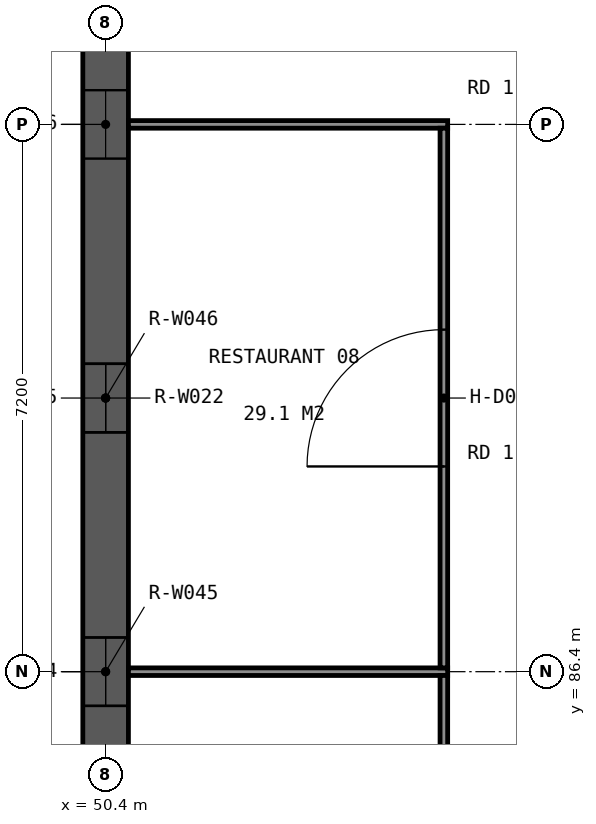
"""IFC4 building model, lengths in metres.
Left out: names, types, materials, properties, quantities, classifications, styles, units other than length and angle.
Written with IfcOpenShell. Run it as: python <this file> out.ifc"""

import sys

from ifc_helpers import new_model, si_unit, direction, frame, frame_2d, origin, place, context, subcontext, project, spatial, polyline, rectangle, outline, extrude, element, fill, save


model = new_model("IFC4")
c1 = context("Model", 3, precision=1e-05, world=origin(), true_north=direction((0.0, 1.0)))
c2 = subcontext(c1, "Body", "Model", "MODEL_VIEW")
j1 = project(units=[si_unit("LENGTHUNIT", "METRE"), si_unit("PLANEANGLEUNIT", "RADIAN")], contexts=[c1])
p1 = place(None, origin())
s1 = spatial("IfcSite", under=j1, at=p1, CompositionType="ELEMENT")
p2 = place(p1, origin())
s2 = spatial("IfcBuilding", under=s1, at=p2, CompositionType="ELEMENT")
p3 = place(p2, frame((0.0, 0.0, 9.6)))
s3 = spatial("IfcBuildingStorey", under=s2, at=p3, CompositionType="ELEMENT", Elevation=9.6)
p4 = place(p3, frame((50.4, 52.2, 0.0), z_axis=(0.0, 0.0, 1.0), x_axis=(0.0, 1.0, 0.0)))
e1 = element("IfcWall", 1, at=p4, inside=s3, PredefinedType="SOLIDWALL", context=c2, shape_type="SweptSolid", body=[
    extrude(outline(polyline([(0.0, 0.0), (54.0, 0.0), (54.0, 6.409), (53.7, 6.509), (53.4, 6.609), (53.1, 6.709), (52.8, 6.809), (52.5, 6.909), (52.2, 7.009), (51.9, 7.109), (51.6, 7.209), (51.3, 7.309), (51.0, 7.409), (50.764, 7.488), (50.762, 7.489), (50.7, 7.509), (50.4, 7.609), (50.1, 7.709), (49.8, 7.809), (49.5, 7.909), (49.2, 8.009), (48.9, 8.109), (48.6, 8.209), (48.3, 8.309), (48.0, 8.409), (47.7, 8.509), (47.4, 8.609), (47.1, 8.709), (46.8, 8.809), (46.5, 8.909), (46.2, 9.009), (46.027, 9.067), (46.025, 9.068), (45.964, 9.088), (45.962, 9.3), (45.9, 9.32), (45.6, 9.42), (45.3, 9.52), (45.0, 9.62), (44.7, 9.72), (44.4, 9.82), (44.1, 9.92), (43.8, 10.02), (43.5, 10.12), (43.2, 10.22), (42.9, 10.32), (42.6, 10.42), (42.3, 10.52), (42.0, 10.62), (41.7, 10.72), (41.4, 10.82), (41.227, 10.878), (41.225, 10.878), (41.1, 10.92), (40.8, 11.02), (40.5, 11.12), (40.2, 11.22), (39.9, 11.32), (39.6, 11.42), (39.3, 11.52), (39.0, 11.62), (38.7, 11.72), (38.4, 11.82), (38.1, 11.92), (37.8, 12.02), (37.5, 12.12), (37.2, 12.22), (36.9, 12.32), (36.6, 12.42), (36.49, 12.457), (36.488, 12.458), (36.427, 12.478), (36.425, 12.689), (36.3, 12.731), (36.0, 12.831), (35.7, 12.931), (35.4, 13.031), (35.1, 13.131), (34.8, 13.231), (34.5, 13.331), (34.2, 13.431), (33.9, 13.531), (33.6, 13.631), (33.3, 13.731), (33.0, 13.831), (32.7, 13.931), (32.4, 14.031), (32.1, 14.131), (31.8, 14.231), (31.69, 14.268), (31.688, 14.268), (31.5, 14.331), (31.2, 14.431), (30.9, 14.531), (30.6, 14.631), (30.3, 14.731), (30.0, 14.831), (29.7, 14.931), (29.4, 15.031), (29.1, 15.131), (28.8, 15.231), (28.5, 15.331), (28.2, 15.431), (27.9, 15.531), (27.6, 15.631), (27.3, 15.731), (27.201, 15.764), (27.199, 15.764), (27.0, 15.764), (26.801, 15.764), (26.799, 15.764), (26.7, 15.731), (26.4, 15.631), (26.1, 15.531), (25.8, 15.431), (25.5, 15.331), (25.2, 15.231), (24.9, 15.131), (24.6, 15.031), (24.3, 14.931), (24.0, 14.831), (23.7, 14.731), (23.4, 14.631), (23.1, 14.531), (22.8, 14.431), (22.5, 14.331), (22.312, 14.268), (22.31, 14.268), (22.2, 14.231), (21.9, 14.131), (21.6, 14.031), (21.3, 13.931), (21.0, 13.831), (20.7, 13.731), (20.4, 13.631), (20.1, 13.531), (19.8, 13.431), (19.5, 13.331), (19.2, 13.231), (18.9, 13.131), (18.6, 13.031), (18.3, 12.931), (18.0, 12.831), (17.7, 12.731), (17.575, 12.689), (17.573, 12.478), (17.512, 12.458), (17.51, 12.457), (17.4, 12.42), (17.1, 12.32), (16.8, 12.22), (16.5, 12.12), (16.2, 12.02), (15.9, 11.92), (15.6, 11.82), (15.3, 11.72), (15.0, 11.62), (14.7, 11.52), (14.4, 11.42), (14.1, 11.32), (13.8, 11.22), (13.5, 11.12), (13.2, 11.02), (12.9, 10.92), (12.775, 10.878), (12.773, 10.878), (12.6, 10.82), (12.3, 10.72), (12.0, 10.62), (11.7, 10.52), (11.4, 10.42), (11.1, 10.32), (10.8, 10.22), (10.5, 10.12), (10.2, 10.02), (9.9, 9.92), (9.6, 9.82), (9.3, 9.72), (9.0, 9.62), (8.7, 9.52), (8.4, 9.42), (8.1, 9.32), (8.038, 9.3), (8.036, 9.088), (7.975, 9.068), (7.973, 9.067), (7.8, 9.009), (7.5, 8.909), (7.2, 8.809), (6.9, 8.709), (6.6, 8.609), (6.3, 8.509), (6.0, 8.409), (5.7, 8.309), (5.4, 8.209), (5.1, 8.109), (4.8, 8.009), (4.5, 7.909), (4.2, 7.809), (3.9, 7.709), (3.6, 7.609), (3.3, 7.509), (3.238, 7.489), (3.236, 7.488), (3.0, 7.409), (2.7, 7.309), (2.4, 7.209), (2.1, 7.109), (1.8, 7.009), (1.5, 6.909), (1.2, 6.809), (0.9, 6.709), (0.6, 6.609), (0.3, 6.509), (0.0, 6.409), (0.0, 0.0)])), frame((0.0, 0.3, 0.0), z_axis=(0.0, -1.0, 0.0), x_axis=(1.0, 0.0, 0.0)), (0.0, 0.0, 1.0), 0.6),
])
p5 = place(p4, frame((1.35, 0.0, 0.9)))
e2 = element("IfcOpeningElement", 2, at=p5, cuts=e1, PredefinedType="OPENING", context=c2, shape_type="SweptSolid", body=[
    extrude(rectangle(XDim=0.9, YDim=3.3, at=frame_2d((0.45, 1.65))), frame((0.0, 0.31, 0.0), z_axis=(0.0, -1.0, 0.0), x_axis=(1.0, 0.0, 0.0)), (0.0, 0.0, 1.0), 0.62),
])
p6 = place(p4, frame((8.55, 0.0, 0.9)))
e3 = element("IfcOpeningElement", 3, at=p6, cuts=e1, PredefinedType="OPENING", context=c2, shape_type="SweptSolid", body=[
    extrude(rectangle(XDim=0.9, YDim=3.3, at=frame_2d((0.45, 1.65))), frame((0.0, 0.31, 0.0), z_axis=(0.0, -1.0, 0.0), x_axis=(1.0, 0.0, 0.0)), (0.0, 0.0, 1.0), 0.62),
])
p7 = place(p4, frame((15.75, 0.0, 0.9)))
e4 = element("IfcOpeningElement", 4, at=p7, cuts=e1, PredefinedType="OPENING", context=c2, shape_type="SweptSolid", body=[
    extrude(rectangle(XDim=0.9, YDim=3.3, at=frame_2d((0.45, 1.65))), frame((0.0, 0.31, 0.0), z_axis=(0.0, -1.0, 0.0), x_axis=(1.0, 0.0, 0.0)), (0.0, 0.0, 1.0), 0.62),
])
p8 = place(p4, frame((22.95, 0.0, 0.9)))
e5 = element("IfcOpeningElement", 5, at=p8, cuts=e1, PredefinedType="OPENING", context=c2, shape_type="SweptSolid", body=[
    extrude(rectangle(XDim=0.9, YDim=3.3, at=frame_2d((0.45, 1.65))), frame((0.0, 0.31, 0.0), z_axis=(0.0, -1.0, 0.0), x_axis=(1.0, 0.0, 0.0)), (0.0, 0.0, 1.0), 0.62),
])
p9 = place(p4, frame((30.15, 0.0, 0.9)))
e6 = element("IfcOpeningElement", 6, at=p9, cuts=e1, PredefinedType="OPENING", context=c2, shape_type="SweptSolid", body=[
    extrude(rectangle(XDim=0.9, YDim=3.3, at=frame_2d((0.45, 1.65))), frame((0.0, 0.31, 0.0), z_axis=(0.0, -1.0, 0.0), x_axis=(1.0, 0.0, 0.0)), (0.0, 0.0, 1.0), 0.62),
])
p10 = place(p4, frame((37.35, 0.0, 0.9)))
e7 = element("IfcOpeningElement", 7, at=p10, cuts=e1, PredefinedType="OPENING", context=c2, shape_type="SweptSolid", body=[
    extrude(rectangle(XDim=0.9, YDim=3.3, at=frame_2d((0.45, 1.65))), frame((0.0, 0.31, 0.0), z_axis=(0.0, -1.0, 0.0), x_axis=(1.0, 0.0, 0.0)), (0.0, 0.0, 1.0), 0.62),
])
p11 = place(p4, frame((44.55, 0.0, 0.9)))
e8 = element("IfcOpeningElement", 8, at=p11, cuts=e1, PredefinedType="OPENING", context=c2, shape_type="SweptSolid", body=[
    extrude(rectangle(XDim=0.9, YDim=3.3, at=frame_2d((0.45, 1.65))), frame((0.0, 0.31, 0.0), z_axis=(0.0, -1.0, 0.0), x_axis=(1.0, 0.0, 0.0)), (0.0, 0.0, 1.0), 0.62),
])
p12 = place(p4, frame((51.75, 0.0, 0.9)))
e9 = element("IfcOpeningElement", 9, at=p12, cuts=e1, PredefinedType="OPENING", context=c2, shape_type="SweptSolid", body=[
    extrude(rectangle(XDim=0.9, YDim=3.3, at=frame_2d((0.45, 1.65))), frame((0.0, 0.31, 0.0), z_axis=(0.0, -1.0, 0.0), x_axis=(1.0, 0.0, 0.0)), (0.0, 0.0, 1.0), 0.62),
])
p13 = place(p4, frame((1.35, 0.0, 4.8)))
e10 = element("IfcOpeningElement", 10, at=p13, cuts=e1, PredefinedType="OPENING", context=c2, shape_type="SweptSolid", body=[
    extrude(rectangle(XDim=0.9, YDim=1.5, at=frame_2d((0.45, 0.75))), frame((0.0, 0.31, 0.0), z_axis=(0.0, -1.0, 0.0), x_axis=(1.0, 0.0, 0.0)), (0.0, 0.0, 1.0), 0.62),
])
p14 = place(p4, frame((4.95, 0.0, 4.8)))
e11 = element("IfcOpeningElement", 11, at=p14, cuts=e1, PredefinedType="OPENING", context=c2, shape_type="SweptSolid", body=[
    extrude(rectangle(XDim=0.9, YDim=2.4, at=frame_2d((0.45, 1.2))), frame((0.0, 0.31, 0.0), z_axis=(0.0, -1.0, 0.0), x_axis=(1.0, 0.0, 0.0)), (0.0, 0.0, 1.0), 0.62),
])
p15 = place(p4, frame((8.55, 0.0, 4.8)))
e12 = element("IfcOpeningElement", 12, at=p15, cuts=e1, PredefinedType="OPENING", context=c2, shape_type="SweptSolid", body=[
    extrude(rectangle(XDim=0.9, YDim=3.3, at=frame_2d((0.45, 1.65))), frame((0.0, 0.31, 0.0), z_axis=(0.0, -1.0, 0.0), x_axis=(1.0, 0.0, 0.0)), (0.0, 0.0, 1.0), 0.62),
])
p16 = place(p4, frame((12.15, 0.0, 4.8)))
e13 = element("IfcOpeningElement", 13, at=p16, cuts=e1, PredefinedType="OPENING", context=c2, shape_type="SweptSolid", body=[
    extrude(rectangle(XDim=0.9, YDim=4.2, at=frame_2d((0.45, 2.1))), frame((0.0, 0.31, 0.0), z_axis=(0.0, -1.0, 0.0), x_axis=(1.0, 0.0, 0.0)), (0.0, 0.0, 1.0), 0.62),
])
p17 = place(p4, frame((15.75, 0.0, 4.8)))
e14 = element("IfcOpeningElement", 14, at=p17, cuts=e1, PredefinedType="OPENING", context=c2, shape_type="SweptSolid", body=[
    extrude(rectangle(XDim=0.9, YDim=4.2, at=frame_2d((0.45, 2.1))), frame((0.0, 0.31, 0.0), z_axis=(0.0, -1.0, 0.0), x_axis=(1.0, 0.0, 0.0)), (0.0, 0.0, 1.0), 0.62),
])
p18 = place(p4, frame((19.35, 0.0, 4.8)))
e15 = element("IfcOpeningElement", 15, at=p18, cuts=e1, PredefinedType="OPENING", context=c2, shape_type="SweptSolid", body=[
    extrude(rectangle(XDim=0.9, YDim=4.2, at=frame_2d((0.45, 2.1))), frame((0.0, 0.31, 0.0), z_axis=(0.0, -1.0, 0.0), x_axis=(1.0, 0.0, 0.0)), (0.0, 0.0, 1.0), 0.62),
])
p19 = place(p4, frame((22.95, 0.0, 4.8)))
e16 = element("IfcOpeningElement", 16, at=p19, cuts=e1, PredefinedType="OPENING", context=c2, shape_type="SweptSolid", body=[
    extrude(rectangle(XDim=0.9, YDim=4.2, at=frame_2d((0.45, 2.1))), frame((0.0, 0.31, 0.0), z_axis=(0.0, -1.0, 0.0), x_axis=(1.0, 0.0, 0.0)), (0.0, 0.0, 1.0), 0.62),
])
p20 = place(p4, frame((26.55, 0.0, 4.8)))
e17 = element("IfcOpeningElement", 17, at=p20, cuts=e1, PredefinedType="OPENING", context=c2, shape_type="SweptSolid", body=[
    extrude(rectangle(XDim=0.9, YDim=4.2, at=frame_2d((0.45, 2.1))), frame((0.0, 0.31, 0.0), z_axis=(0.0, -1.0, 0.0), x_axis=(1.0, 0.0, 0.0)), (0.0, 0.0, 1.0), 0.62),
])
p21 = place(p4, frame((30.15, 0.0, 4.8)))
e18 = element("IfcOpeningElement", 18, at=p21, cuts=e1, PredefinedType="OPENING", context=c2, shape_type="SweptSolid", body=[
    extrude(rectangle(XDim=0.9, YDim=4.2, at=frame_2d((0.45, 2.1))), frame((0.0, 0.31, 0.0), z_axis=(0.0, -1.0, 0.0), x_axis=(1.0, 0.0, 0.0)), (0.0, 0.0, 1.0), 0.62),
])
p22 = place(p4, frame((33.75, 0.0, 4.8)))
e19 = element("IfcOpeningElement", 19, at=p22, cuts=e1, PredefinedType="OPENING", context=c2, shape_type="SweptSolid", body=[
    extrude(rectangle(XDim=0.9, YDim=4.2, at=frame_2d((0.45, 2.1))), frame((0.0, 0.31, 0.0), z_axis=(0.0, -1.0, 0.0), x_axis=(1.0, 0.0, 0.0)), (0.0, 0.0, 1.0), 0.62),
])
p23 = place(p4, frame((37.35, 0.0, 4.8)))
e20 = element("IfcOpeningElement", 20, at=p23, cuts=e1, PredefinedType="OPENING", context=c2, shape_type="SweptSolid", body=[
    extrude(rectangle(XDim=0.9, YDim=4.2, at=frame_2d((0.45, 2.1))), frame((0.0, 0.31, 0.0), z_axis=(0.0, -1.0, 0.0), x_axis=(1.0, 0.0, 0.0)), (0.0, 0.0, 1.0), 0.62),
])
p24 = place(p4, frame((40.95, 0.0, 4.8)))
e21 = element("IfcOpeningElement", 21, at=p24, cuts=e1, PredefinedType="OPENING", context=c2, shape_type="SweptSolid", body=[
    extrude(rectangle(XDim=0.9, YDim=4.2, at=frame_2d((0.45, 2.1))), frame((0.0, 0.31, 0.0), z_axis=(0.0, -1.0, 0.0), x_axis=(1.0, 0.0, 0.0)), (0.0, 0.0, 1.0), 0.62),
])
p25 = place(p4, frame((44.55, 0.0, 4.8)))
e22 = element("IfcOpeningElement", 22, at=p25, cuts=e1, PredefinedType="OPENING", context=c2, shape_type="SweptSolid", body=[
    extrude(rectangle(XDim=0.9, YDim=3.3, at=frame_2d((0.45, 1.65))), frame((0.0, 0.31, 0.0), z_axis=(0.0, -1.0, 0.0), x_axis=(1.0, 0.0, 0.0)), (0.0, 0.0, 1.0), 0.62),
])
p26 = place(p4, frame((48.15, 0.0, 4.8)))
e23 = element("IfcOpeningElement", 23, at=p26, cuts=e1, PredefinedType="OPENING", context=c2, shape_type="SweptSolid", body=[
    extrude(rectangle(XDim=0.9, YDim=2.4, at=frame_2d((0.45, 1.2))), frame((0.0, 0.31, 0.0), z_axis=(0.0, -1.0, 0.0), x_axis=(1.0, 0.0, 0.0)), (0.0, 0.0, 1.0), 0.62),
])
p27 = place(p4, frame((51.75, 0.0, 4.8)))
e24 = element("IfcOpeningElement", 24, at=p27, cuts=e1, PredefinedType="OPENING", context=c2, shape_type="SweptSolid", body=[
    extrude(rectangle(XDim=0.9, YDim=1.5, at=frame_2d((0.45, 0.75))), frame((0.0, 0.31, 0.0), z_axis=(0.0, -1.0, 0.0), x_axis=(1.0, 0.0, 0.0)), (0.0, 0.0, 1.0), 0.62),
])
p28 = place(p4, frame((15.75, 0.0, 9.6)))
e25 = element("IfcOpeningElement", 25, at=p28, cuts=e1, PredefinedType="OPENING", context=c2, shape_type="SweptSolid", body=[
    extrude(rectangle(XDim=0.9, YDim=1.5, at=frame_2d((0.45, 0.75))), frame((0.0, 0.31, 0.0), z_axis=(0.0, -1.0, 0.0), x_axis=(1.0, 0.0, 0.0)), (0.0, 0.0, 1.0), 0.62),
])
p29 = place(p4, frame((19.35, 0.0, 9.6)))
e26 = element("IfcOpeningElement", 26, at=p29, cuts=e1, PredefinedType="OPENING", context=c2, shape_type="SweptSolid", body=[
    extrude(rectangle(XDim=0.9, YDim=2.4, at=frame_2d((0.45, 1.2))), frame((0.0, 0.31, 0.0), z_axis=(0.0, -1.0, 0.0), x_axis=(1.0, 0.0, 0.0)), (0.0, 0.0, 1.0), 0.62),
])
p30 = place(p4, frame((22.95, 0.0, 9.6)))
e27 = element("IfcOpeningElement", 27, at=p30, cuts=e1, PredefinedType="OPENING", context=c2, shape_type="SweptSolid", body=[
    extrude(rectangle(XDim=0.9, YDim=4.2, at=frame_2d((0.45, 2.1))), frame((0.0, 0.31, 0.0), z_axis=(0.0, -1.0, 0.0), x_axis=(1.0, 0.0, 0.0)), (0.0, 0.0, 1.0), 0.62),
])
p31 = place(p4, frame((26.55, 0.0, 9.6)))
e28 = element("IfcOpeningElement", 28, at=p31, cuts=e1, PredefinedType="OPENING", context=c2, shape_type="SweptSolid", body=[
    extrude(rectangle(XDim=0.9, YDim=4.2, at=frame_2d((0.45, 2.1))), frame((0.0, 0.31, 0.0), z_axis=(0.0, -1.0, 0.0), x_axis=(1.0, 0.0, 0.0)), (0.0, 0.0, 1.0), 0.62),
])
p32 = place(p4, frame((30.15, 0.0, 9.6)))
e29 = element("IfcOpeningElement", 29, at=p32, cuts=e1, PredefinedType="OPENING", context=c2, shape_type="SweptSolid", body=[
    extrude(rectangle(XDim=0.9, YDim=4.2, at=frame_2d((0.45, 2.1))), frame((0.0, 0.31, 0.0), z_axis=(0.0, -1.0, 0.0), x_axis=(1.0, 0.0, 0.0)), (0.0, 0.0, 1.0), 0.62),
])
p33 = place(p4, frame((33.75, 0.0, 9.6)))
e30 = element("IfcOpeningElement", 30, at=p33, cuts=e1, PredefinedType="OPENING", context=c2, shape_type="SweptSolid", body=[
    extrude(rectangle(XDim=0.9, YDim=2.4, at=frame_2d((0.45, 1.2))), frame((0.0, 0.31, 0.0), z_axis=(0.0, -1.0, 0.0), x_axis=(1.0, 0.0, 0.0)), (0.0, 0.0, 1.0), 0.62),
])
p34 = place(p4, frame((37.35, 0.0, 9.6)))
e31 = element("IfcOpeningElement", 31, at=p34, cuts=e1, PredefinedType="OPENING", context=c2, shape_type="SweptSolid", body=[
    extrude(rectangle(XDim=0.9, YDim=1.5, at=frame_2d((0.45, 0.75))), frame((0.0, 0.31, 0.0), z_axis=(0.0, -1.0, 0.0), x_axis=(1.0, 0.0, 0.0)), (0.0, 0.0, 1.0), 0.62),
])
for number, where, z_axis, x_axis in (
    (32, (50.7, 86.4, 0.0), (0.0, 0.0, 1.0), (1.0, 0.0, 0.0)),
    (33, (50.7, 93.6, 0.0), (0.0, 0.0, 1.0), (1.0, 0.0, 0.0)),
):
    element("IfcWall", number, at=place(p3, frame(where, z_axis=z_axis, x_axis=x_axis)), inside=s3, PredefinedType="PARTITIONING", context=c2, shape_type="SweptSolid", body=[
        extrude(rectangle(XDim=4.2, YDim=0.1, at=frame_2d((2.1, 0.0))), origin(), (0.0, 0.0, 1.0), 4.7),
    ])
p35 = place(p3, frame((54.85, 79.25, 0.0), z_axis=(0.0, 0.0, 1.0), x_axis=(0.0, 1.0, 0.0)))
e34 = element("IfcWall", 34, at=p35, inside=s3, PredefinedType="PARTITIONING", context=c2, shape_type="SweptSolid", body=[
    extrude(rectangle(XDim=7.1, YDim=0.1, at=frame_2d((3.55, 0.0))), origin(), (0.0, 0.0, 1.0), 4.7),
])
p36 = place(p35, frame((3.05, 0.0, 0.0)))
e35 = element("IfcOpeningElement", 35, at=p36, cuts=e34, PredefinedType="OPENING", context=c2, shape_type="SweptSolid", body=[
    extrude(rectangle(XDim=1.0, YDim=2.1, at=frame_2d((0.5, 1.05))), frame((0.0, 0.06, 0.0), z_axis=(0.0, -1.0, 0.0), x_axis=(1.0, 0.0, 0.0)), (0.0, 0.0, 1.0), 0.12),
])
p37 = place(p3, frame((54.85, 86.45, 0.0), z_axis=(0.0, 0.0, 1.0), x_axis=(0.0, 1.0, 0.0)))
e36 = element("IfcWall", 36, at=p37, inside=s3, PredefinedType="PARTITIONING", context=c2, shape_type="SweptSolid", body=[
    extrude(rectangle(XDim=7.1, YDim=0.1, at=frame_2d((3.55, 0.0))), origin(), (0.0, 0.0, 1.0), 4.7),
])
p38 = place(p37, frame((2.65, 0.0, 0.0)))
e37 = element("IfcOpeningElement", 37, at=p38, cuts=e36, PredefinedType="OPENING", context=c2, shape_type="SweptSolid", body=[
    extrude(rectangle(XDim=1.8, YDim=2.1, at=frame_2d((0.9, 1.05))), frame((0.0, 0.06, 0.0), z_axis=(0.0, -1.0, 0.0), x_axis=(1.0, 0.0, 0.0)), (0.0, 0.0, 1.0), 0.12),
])
p39 = place(p10, origin())
e38 = element("IfcWindow", 38, at=p39, inside=s3, PartitioningType="SINGLE_PANEL", PredefinedType="WINDOW", context=c2, shape_type="SweptSolid", body=[
    extrude(rectangle(XDim=0.9, YDim=3.3, at=frame_2d((0.45, 1.65))), frame((0.0, 0.03, 0.0), z_axis=(0.0, -1.0, 0.0), x_axis=(1.0, 0.0, 0.0)), (0.0, 0.0, 1.0), 0.06),
])
fill(e7, e38)
p40 = place(p22, origin())
e39 = element("IfcWindow", 39, at=p40, inside=s3, PartitioningType="SINGLE_PANEL", PredefinedType="WINDOW", context=c2, shape_type="SweptSolid", body=[
    extrude(rectangle(XDim=0.9, YDim=4.2, at=frame_2d((0.45, 2.1))), frame((0.0, 0.03, 0.0), z_axis=(0.0, -1.0, 0.0), x_axis=(1.0, 0.0, 0.0)), (0.0, 0.0, 1.0), 0.06),
])
fill(e19, e39)
p41 = place(p23, origin())
e40 = element("IfcWindow", 40, at=p41, inside=s3, PartitioningType="SINGLE_PANEL", PredefinedType="WINDOW", context=c2, shape_type="SweptSolid", body=[
    extrude(rectangle(XDim=0.9, YDim=4.2, at=frame_2d((0.45, 2.1))), frame((0.0, 0.03, 0.0), z_axis=(0.0, -1.0, 0.0), x_axis=(1.0, 0.0, 0.0)), (0.0, 0.0, 1.0), 0.06),
])
fill(e20, e40)
p42 = place(p24, origin())
e41 = element("IfcWindow", 41, at=p42, inside=s3, PartitioningType="SINGLE_PANEL", PredefinedType="WINDOW", context=c2, shape_type="SweptSolid", body=[
    extrude(rectangle(XDim=0.9, YDim=4.2, at=frame_2d((0.45, 2.1))), frame((0.0, 0.03, 0.0), z_axis=(0.0, -1.0, 0.0), x_axis=(1.0, 0.0, 0.0)), (0.0, 0.0, 1.0), 0.06),
])
fill(e21, e41)
p43 = place(p33, origin())
e42 = element("IfcWindow", 42, at=p43, inside=s3, PartitioningType="SINGLE_PANEL", PredefinedType="WINDOW", context=c2, shape_type="SweptSolid", body=[
    extrude(rectangle(XDim=0.9, YDim=2.4, at=frame_2d((0.45, 1.2))), frame((0.0, 0.03, 0.0), z_axis=(0.0, -1.0, 0.0), x_axis=(1.0, 0.0, 0.0)), (0.0, 0.0, 1.0), 0.06),
])
fill(e30, e42)
p44 = place(p34, origin())
e43 = element("IfcWindow", 43, at=p44, inside=s3, PartitioningType="SINGLE_PANEL", PredefinedType="WINDOW", context=c2, shape_type="SweptSolid", body=[
    extrude(rectangle(XDim=0.9, YDim=1.5, at=frame_2d((0.45, 0.75))), frame((0.0, 0.03, 0.0), z_axis=(0.0, -1.0, 0.0), x_axis=(1.0, 0.0, 0.0)), (0.0, 0.0, 1.0), 0.06),
])
fill(e31, e43)
p45 = place(p38, origin())
e44 = element("IfcDoor", 44, at=p45, inside=s3, OperationType="DOUBLE_DOOR_SINGLE_SWING", PredefinedType="DOOR", context=c2, shape_type="SweptSolid", body=[
    extrude(rectangle(XDim=1.8, YDim=2.1, at=frame_2d((0.9, 1.05))), frame((0.0, 0.025, 0.0), z_axis=(0.0, -1.0, 0.0), x_axis=(1.0, 0.0, 0.0)), (0.0, 0.0, 1.0), 0.05),
])
fill(e37, e44)
save(model, sys.argv[1])
